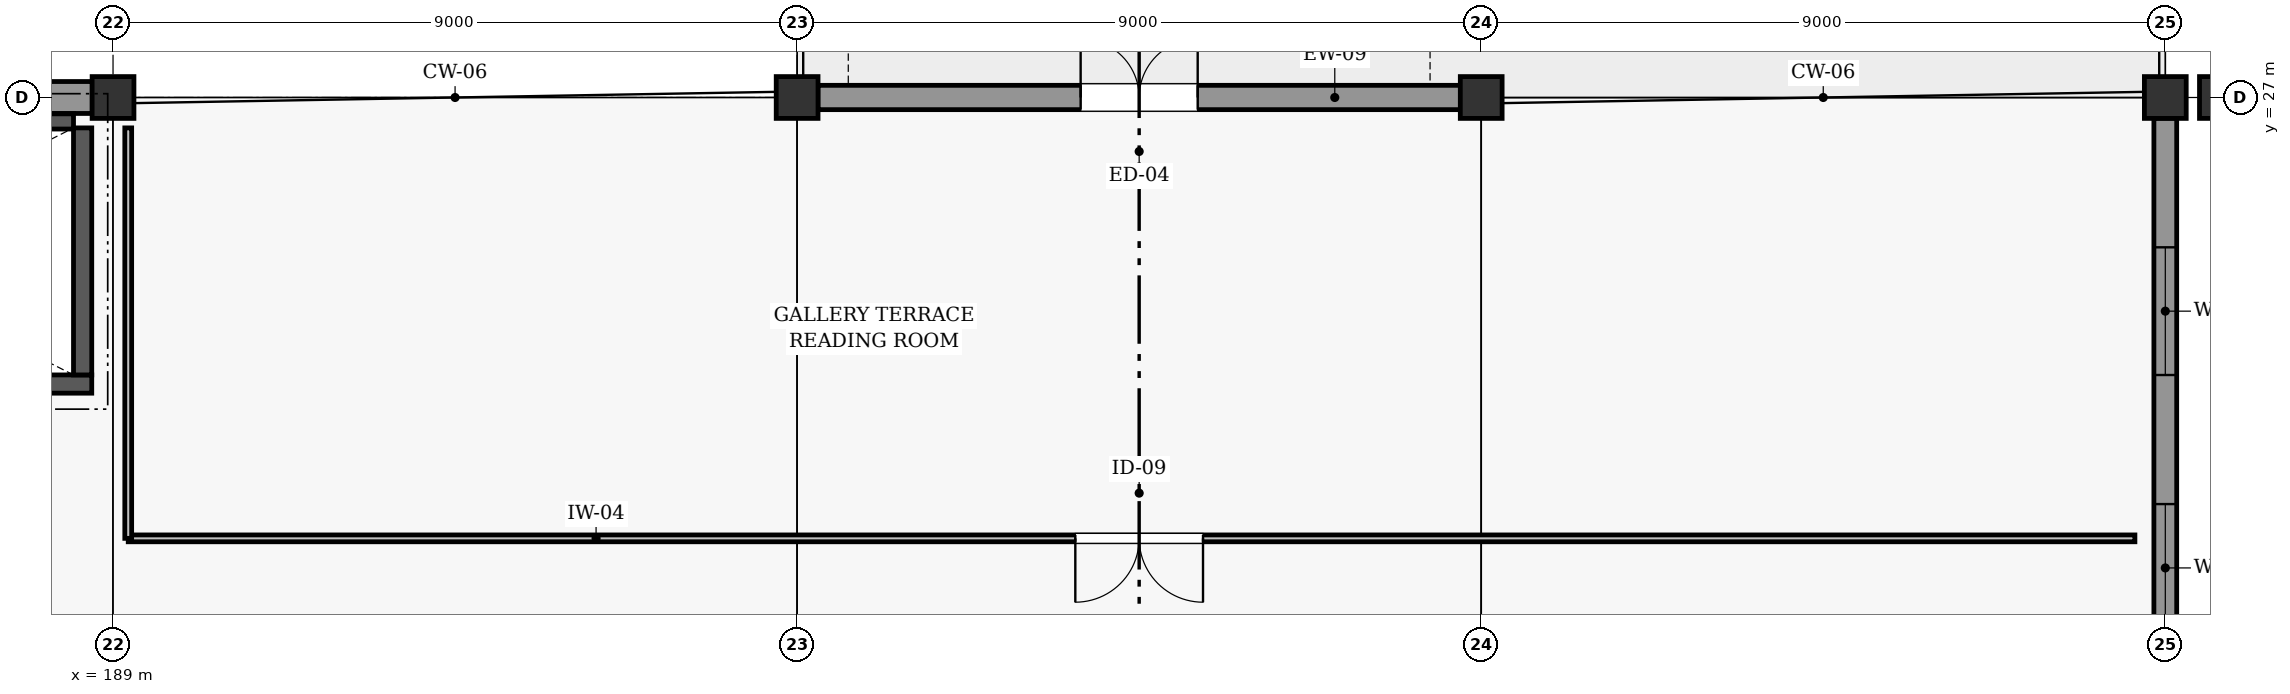
"""IFC4 building model, lengths in metres.
Left out: names, types, materials, properties, quantities, classifications, styles, units other than length and angle.
Written with IfcOpenShell. Run it as: python <this file> out.ifc"""

import sys

from ifc_helpers import new_model, si_unit, direction, frame, frame_2d, origin, origin_2d, place, context, subcontext, project, spatial, rectangle, extrude, element, fill, save


model = new_model("IFC4")
c1 = context("Model", 3, precision=1e-05, world=origin(), true_north=direction((0.0, 1.0)))
c2 = subcontext(c1, "Body", "Model", "MODEL_VIEW")
j1 = project(units=[si_unit("LENGTHUNIT", "METRE"), si_unit("PLANEANGLEUNIT", "RADIAN")], contexts=[c1])
p1 = place(None, origin())
s1 = spatial("IfcSite", under=j1, at=p1, CompositionType="ELEMENT")
p2 = place(p1, origin())
s2 = spatial("IfcBuilding", under=s1, at=p2, CompositionType="ELEMENT")
p3 = place(p2, frame((0.0, 0.0, 4.8)))
s3 = spatial("IfcBuildingStorey", under=s2, at=p3, CompositionType="ELEMENT", Elevation=4.8)
for number, where, z_axis, x_axis in (
    (1, (189.0, 27.0, 0.0), (0.0, 0.0, 1.0), (1.0, 0.0, 0.0)),
    (2, (198.0, 27.0, 0.0), (0.0, 0.0, 1.0), (1.0, 0.0, 0.0)),
    (3, (207.0, 27.0, 0.0), (0.0, 0.0, 1.0), (1.0, 0.0, 0.0)),
    (4, (216.0, 27.0, 0.0), (0.0, 0.0, 1.0), (1.0, 0.0, 0.0)),
):
    element("IfcColumn", number, at=place(p3, frame(where, z_axis=z_axis, x_axis=x_axis)), inside=s3, PredefinedType="COLUMN", context=c2, shape_type="SweptSolid", body=[
        extrude(rectangle(XDim=0.55, YDim=0.55, at=origin_2d()), origin(), (0.0, 0.0, 1.0), 3.6),
    ])
p4 = place(p3, frame((216.85, 27.0, 0.0), z_axis=(0.0, 0.0, 1.0), x_axis=(0.0, 1.0, 0.0)))
e5 = element("IfcColumn", 5, at=p4, inside=s3, PredefinedType="PILASTER", context=c2, shape_type="SweptSolid", body=[
    extrude(rectangle(XDim=0.55, YDim=0.8, at=origin_2d()), origin(), (0.0, 0.0, 1.0), 3.6),
])
p5 = place(p3, frame((180.273, 27.0, 0.0), z_axis=(0.0, 0.0, 1.0), x_axis=(1.0, 0.0, 0.0)))
e6 = element("IfcWall", 6, at=p5, inside=s3, PredefinedType="SOLIDWALL", context=c2, shape_type="SweptSolid", body=[
    extrude(rectangle(XDim=8.454, YDim=0.42, at=frame_2d((4.227, 0.0))), origin(), (0.0, 0.0, 1.0), 2.762),
])
p6 = place(p3, frame((198.273, 27.0, 0.0), z_axis=(0.0, 0.0, 1.0), x_axis=(1.0, 0.0, 0.0)))
e7 = element("IfcWall", 7, at=p6, inside=s3, PredefinedType="SOLIDWALL", context=c2, shape_type="SweptSolid", body=[
    extrude(rectangle(XDim=8.454, YDim=0.32, at=frame_2d((4.227, 0.0))), origin(), (0.0, 0.0, 1.0), 2.702),
])
p7 = place(p6, frame((3.457, 0.0, 0.0)))
e8 = element("IfcOpeningElement", 8, at=p7, cuts=e7, PredefinedType="OPENING", context=c2, shape_type="SweptSolid", body=[
    extrude(rectangle(XDim=1.54, YDim=2.12, at=frame_2d((0.77, 1.06))), frame((0.0, 0.17, 0.0), z_axis=(0.0, -1.0, 0.0), x_axis=(1.0, 0.0, 0.0)), (0.0, 0.0, 1.0), 0.34),
])
p8 = place(p3, frame((216.0, 18.273, 0.0), z_axis=(0.0, 0.0, 1.0), x_axis=(0.0, 1.0, 0.0)))
e9 = element("IfcWall", 9, at=p8, inside=s3, PredefinedType="SOLIDWALL", context=c2, shape_type="SweptSolid", body=[
    extrude(rectangle(XDim=8.454, YDim=0.3, at=frame_2d((4.227, 0.0))), origin(), (0.0, 0.0, 1.0), 2.702),
])
p9 = place(p8, frame((1.698, 0.0, 0.85)))
e10 = element("IfcOpeningElement", 10, at=p9, cuts=e9, PredefinedType="OPENING", context=c2, shape_type="SweptSolid", body=[
    extrude(rectangle(XDim=1.68, YDim=1.66, at=frame_2d((0.84, 0.83))), frame((0.0, 0.16, 0.0), z_axis=(0.0, -1.0, 0.0), x_axis=(1.0, 0.0, 0.0)), (0.0, 0.0, 1.0), 0.32),
])
p10 = place(p8, frame((5.076, 0.0, 0.85)))
e11 = element("IfcOpeningElement", 11, at=p10, cuts=e9, PredefinedType="OPENING", context=c2, shape_type="SweptSolid", body=[
    extrude(rectangle(XDim=1.68, YDim=1.66, at=frame_2d((0.84, 0.83))), frame((0.0, 0.16, 0.0), z_axis=(0.0, -1.0, 0.0), x_axis=(1.0, 0.0, 0.0)), (0.0, 0.0, 1.0), 0.32),
])
p11 = place(p3, frame((180.28, 23.23, 0.0), z_axis=(0.0, 0.0, 1.0), x_axis=(1.0, 0.0, 0.0)))
e12 = element("IfcWall", 12, at=p11, inside=s3, PredefinedType="SHEAR", context=c2, shape_type="SweptSolid", body=[
    extrude(rectangle(XDim=8.44, YDim=0.24, at=frame_2d((4.22, 0.0))), origin(), (0.0, 0.0, 1.0), 3.35),
])
p12 = place(p11, frame((0.48, 0.0, 0.0)))
e13 = element("IfcOpeningElement", 13, at=p12, cuts=e12, PredefinedType="OPENING", context=c2, shape_type="SweptSolid", body=[
    extrude(rectangle(XDim=1.08, YDim=2.08, at=frame_2d((0.54, 1.04))), frame((0.0, 0.13, 0.0), z_axis=(0.0, -1.0, 0.0), x_axis=(1.0, 0.0, 0.0)), (0.0, 0.0, 1.0), 0.26),
])
p13 = place(p3, frame((182.07, 26.685, 0.0), z_axis=(0.0, 0.0, 1.0), x_axis=(1.0, 0.0, 0.0)))
e14 = element("IfcWall", 14, at=p13, inside=s3, PredefinedType="SHEAR", context=c2, shape_type="SweptSolid", body=[
    extrude(rectangle(XDim=6.41, YDim=0.2, at=frame_2d((3.205, 0.0))), origin(), (0.0, 0.0, 1.0), 3.35),
])
p14 = place(p3, frame((188.6, 23.35, 0.0), z_axis=(0.0, 0.0, 1.0), x_axis=(0.0, 1.0, 0.0)))
e15 = element("IfcWall", 15, at=p14, inside=s3, PredefinedType="SHEAR", context=c2, shape_type="SweptSolid", body=[
    extrude(rectangle(XDim=3.25, YDim=0.24, at=frame_2d((1.625, 0.0))), origin(), (0.0, 0.0, 1.0), 3.35),
])
p15 = place(p3, frame((189.2, 21.2, 0.0), z_axis=(0.0, 0.0, 1.0), x_axis=(1.0, 0.0, 0.0)))
e16 = element("IfcWall", 16, at=p15, inside=s3, PredefinedType="MOVABLE", context=c2, shape_type="SweptSolid", body=[
    extrude(rectangle(XDim=26.4, YDim=0.09, at=frame_2d((13.2, 0.0))), origin(), (0.0, 0.0, 1.0), 2.705),
])
p16 = place(p15, frame((12.46, 0.0, 0.0)))
e17 = element("IfcOpeningElement", 17, at=p16, cuts=e16, PredefinedType="OPENING", context=c2, shape_type="SweptSolid", body=[
    extrude(rectangle(XDim=1.68, YDim=2.14, at=frame_2d((0.84, 1.07))), frame((0.0, 0.055, 0.0), z_axis=(0.0, -1.0, 0.0), x_axis=(1.0, 0.0, 0.0)), (0.0, 0.0, 1.0), 0.11),
])
p17 = place(p3, frame((189.2, 21.2, 0.0), z_axis=(0.0, 0.0, 1.0), x_axis=(0.0, 1.0, 0.0)))
e18 = element("IfcWall", 18, at=p17, inside=s3, PredefinedType="MOVABLE", context=c2, shape_type="SweptSolid", body=[
    extrude(rectangle(XDim=5.4, YDim=0.09, at=frame_2d((2.7, 0.0))), origin(), (0.0, 0.0, 1.0), 2.865),
])
p18 = place(p7, origin())
e19 = element("IfcDoor", 19, at=p18, inside=s3, OperationType="DOUBLE_SWING_LEFT", PredefinedType="DOOR", context=c2, shape_type="SweptSolid", body=[
    extrude(rectangle(XDim=1.54, YDim=2.12, at=frame_2d((0.77, 1.06))), frame((0.0, 0.025, 0.0), z_axis=(0.0, -1.0, 0.0), x_axis=(1.0, 0.0, 0.0)), (0.0, 0.0, 1.0), 0.05),
])
fill(e8, e19)
p19 = place(p9, origin())
e20 = element("IfcWindow", 20, at=p19, inside=s3, PartitioningType="SINGLE_PANEL", PredefinedType="WINDOW", context=c2, shape_type="SweptSolid", body=[
    extrude(rectangle(XDim=1.68, YDim=1.66, at=frame_2d((0.84, 0.83))), frame((0.0, 0.03, 0.0), z_axis=(0.0, -1.0, 0.0), x_axis=(1.0, 0.0, 0.0)), (0.0, 0.0, 1.0), 0.06),
])
fill(e10, e20)
p20 = place(p10, origin())
e21 = element("IfcWindow", 21, at=p20, inside=s3, PartitioningType="SINGLE_PANEL", PredefinedType="WINDOW", context=c2, shape_type="SweptSolid", body=[
    extrude(rectangle(XDim=1.68, YDim=1.66, at=frame_2d((0.84, 0.83))), frame((0.0, 0.03, 0.0), z_axis=(0.0, -1.0, 0.0), x_axis=(1.0, 0.0, 0.0)), (0.0, 0.0, 1.0), 0.06),
])
fill(e11, e21)
p21 = place(p16, frame((1.68, 0.0, 0.0), z_axis=(0.0, 0.0, 1.0), x_axis=(-1.0, 0.0, 0.0)))
e22 = element("IfcDoor", 22, at=p21, inside=s3, OperationType="DOUBLE_SWING_LEFT", PredefinedType="DOOR", context=c2, shape_type="SweptSolid", body=[
    extrude(rectangle(XDim=1.68, YDim=2.14, at=frame_2d((0.84, 1.07))), frame((0.0, 0.025, 0.0), z_axis=(0.0, -1.0, 0.0), x_axis=(1.0, 0.0, 0.0)), (0.0, 0.0, 1.0), 0.05),
])
fill(e17, e22)
save(model, sys.argv[1])
